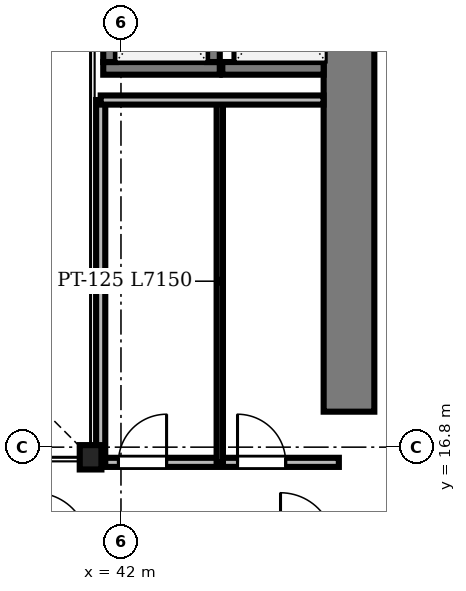
"""IFC4 building model, lengths in metres.
Left out: names, types, materials, properties, quantities, classifications, styles, units other than length and angle.
Written with IfcOpenShell. Run it as: python <this file> out.ifc"""

import sys

from ifc_helpers import new_model, si_unit, direction, frame, frame_2d, origin, origin_2d, place, context, subcontext, project, spatial, rectangle, i_section, extrude, source, transform, mapped, element, fill, save


model = new_model("IFC4")
c1 = context("Model", 3, precision=1e-05, world=origin(), true_north=direction((0.0, 1.0)))
c2 = subcontext(c1, "Body", "Model", "MODEL_VIEW")
j1 = project(units=[si_unit("LENGTHUNIT", "METRE"), si_unit("PLANEANGLEUNIT", "RADIAN")], contexts=[c1])
p1 = place(None, origin())
s1 = spatial("IfcSite", under=j1, at=p1, CompositionType="ELEMENT")
p2 = place(p1, origin())
s2 = spatial("IfcBuilding", under=s1, at=p2, CompositionType="ELEMENT")
p3 = place(p2, frame((0.0, 0.0, 56.8)))
s3 = spatial("IfcBuildingStorey", under=s2, at=p3, CompositionType="ELEMENT", Elevation=56.8)
m1 = source(origin(), c2, "Body", "SweptSolid", [
    extrude(rectangle(XDim=13.15, YDim=1.0, at=frame_2d((6.575, 0.0))), origin(), (0.0, 0.0, 1.0), 3.41),
])
p4 = place(p3, frame((46.5, 17.5, 0.0), z_axis=(0.0, 0.0, 1.0), x_axis=(0.0, 1.0, 0.0)))
e1 = element("IfcWall", 1, at=p4, inside=s3, PredefinedType="SHEAR", context=c2, shape_type="MappedRepresentation", body=[
    mapped(m1, transform((0.0, 0.0, 0.0), scale=1.0)),
])
m2 = source(origin(), c2, "Body", "SweptSolid", [
    extrude(i_section(OverallWidth=0.428, OverallDepth=0.481, WebThickness=0.04, FlangeThickness=0.063, FilletRadius=0.015, at=origin_2d()), origin(), (0.0, 0.0, 1.0), 3.41),
])
p5 = place(p3, frame((41.4, 16.6, 0.0), z_axis=(0.0, 0.0, 1.0), x_axis=(1.0, 0.0, 0.0)))
e2 = element("IfcColumn", 2, at=p5, inside=s3, PredefinedType="COLUMN", context=c2, shape_type="MappedRepresentation", body=[
    mapped(m2, transform((0.0, 0.0, 0.0), scale=1.0)),
])
m3 = source(origin(), c2, "Body", "SweptSolid", [
    extrude(rectangle(XDim=2.3, YDim=0.25, at=frame_2d((1.15, 0.0))), origin(), (0.0, 0.0, 1.0), 3.41),
])
for number, where, z_axis, x_axis in (
    (3, (41.65, 24.275, 0.0), (0.0, 0.0, 1.0), (1.0, 0.0, 0.0)),
    (4, (41.775, 24.4, 0.0), (0.0, 0.0, 1.0), (0.0, 1.0, 0.0)),
    (5, (43.825, 24.4, 0.0), (0.0, 0.0, 1.0), (0.0, 1.0, 0.0)),
):
    element("IfcWall", number, at=place(p3, frame(where, z_axis=z_axis, x_axis=x_axis)), inside=s3, PredefinedType="SOLIDWALL", context=c2, shape_type="MappedRepresentation", body=[
        mapped(m3, transform((0.0, 0.0, 0.0), scale=1.0)),
    ])
m4 = source(origin(), c2, "Body", "SweptSolid", [
    extrude(rectangle(XDim=2.0, YDim=0.25, at=frame_2d((1.0, 0.0))), origin(), (0.0, 0.0, 1.0), 3.41),
])
p6 = place(p3, frame((44.0, 24.275, 0.0), z_axis=(0.0, 0.0, 1.0), x_axis=(1.0, 0.0, 0.0)))
e6 = element("IfcWall", 6, at=p6, inside=s3, PredefinedType="SOLIDWALL", context=c2, shape_type="MappedRepresentation", body=[
    mapped(m4, transform((0.0, 0.0, 0.0), scale=1.0)),
])
m5 = source(origin(), c2, "Body", "SweptSolid", [
    extrude(rectangle(XDim=4.7, YDim=0.18, at=frame_2d((2.35, 0.0))), origin(), (0.0, 0.0, 1.0), 2.802),
])
p7 = place(p3, frame((41.6, 16.5, 0.0), z_axis=(0.0, 0.0, 1.0), x_axis=(1.0, 0.0, 0.0)))
e7 = element("IfcWall", 7, at=p7, inside=s3, PredefinedType="PARTITIONING", context=c2, shape_type="MappedRepresentation", body=[
    mapped(m5, transform((0.0, 0.0, 0.0), scale=1.0)),
])
m6 = source(origin(), c2, "Body", "SweptSolid", [
    extrude(rectangle(XDim=0.95, YDim=2.15, at=frame_2d((0.475, 1.075))), frame((0.0, 0.1, 0.0), z_axis=(0.0, -1.0, 0.0), x_axis=(1.0, 0.0, 0.0)), (0.0, 0.0, 1.0), 0.2),
])
p8 = place(p7, frame((0.35, 0.0, 0.0)))
e8 = element("IfcOpeningElement", 8, at=p8, cuts=e7, PredefinedType="OPENING", context=c2, shape_type="MappedRepresentation", body=[
    mapped(m6, transform((0.0, 0.0, 0.0), scale=1.0)),
])
p9 = place(p7, frame((2.7, 0.0, 0.0)))
e9 = element("IfcOpeningElement", 9, at=p9, cuts=e7, PredefinedType="OPENING", context=c2, shape_type="MappedRepresentation", body=[
    mapped(m6, transform((0.0, 0.0, 0.0), scale=1.0)),
])
m7 = source(origin(), c2, "Body", "SweptSolid", [
    extrude(rectangle(XDim=7.15, YDim=0.18, at=frame_2d((3.575, 0.0))), origin(), (0.0, 0.0, 1.0), 2.802),
])
p10 = place(p3, frame((41.6, 16.5, 0.0), z_axis=(0.0, 0.0, 1.0), x_axis=(0.0, 1.0, 0.0)))
e10 = element("IfcWall", 10, at=p10, inside=s3, PredefinedType="PARTITIONING", context=c2, shape_type="MappedRepresentation", body=[
    mapped(m7, transform((0.0, 0.0, 0.0), scale=1.0)),
])
m8 = source(origin(), c2, "Body", "SweptSolid", [
    extrude(rectangle(XDim=7.15, YDim=0.125, at=frame_2d((3.575, 0.0))), origin(), (0.0, 0.0, 1.0), 2.802),
])
p11 = place(p3, frame((43.95, 16.5, 0.0), z_axis=(0.0, 0.0, 1.0), x_axis=(0.0, 1.0, 0.0)))
e11 = element("IfcWall", 11, at=p11, inside=s3, PredefinedType="PARTITIONING", context=c2, shape_type="MappedRepresentation", body=[
    mapped(m8, transform((0.0, 0.0, 0.0), scale=1.0)),
])
m9 = source(origin(), c2, "Body", "SweptSolid", [
    extrude(rectangle(XDim=4.398, YDim=0.18, at=frame_2d((2.199, 0.0))), origin(), (0.0, 0.0, 1.0), 3.41),
])
p12 = place(p3, frame((41.6, 23.65, 0.0), z_axis=(0.0, 0.0, 1.0), x_axis=(1.0, 0.0, 0.0)))
e12 = element("IfcWall", 12, at=p12, inside=s3, PredefinedType="PARTITIONING", context=c2, shape_type="MappedRepresentation", body=[
    mapped(m9, transform((0.0, 0.0, 0.0), scale=1.0)),
])
m10 = source(origin(), c2, "Body", "SweptSolid", [
    extrude(rectangle(XDim=0.95, YDim=2.15, at=frame_2d((0.475, 1.075))), frame((0.0, 0.025, 0.0), z_axis=(0.0, -1.0, 0.0), x_axis=(1.0, 0.0, 0.0)), (0.0, 0.0, 1.0), 0.05),
])
p13 = place(p8, origin())
e13 = element("IfcDoor", 13, at=p13, inside=s3, OperationType="SINGLE_SWING_RIGHT", PredefinedType="DOOR", context=c2, shape_type="MappedRepresentation", body=[
    mapped(m10, transform((0.0, 0.0, 0.0), scale=1.0)),
])
fill(e8, e13)
p14 = place(p9, origin())
e14 = element("IfcDoor", 14, at=p14, inside=s3, OperationType="SINGLE_SWING_LEFT", PredefinedType="DOOR", context=c2, shape_type="MappedRepresentation", body=[
    mapped(m10, transform((0.0, 0.0, 0.0), scale=1.0)),
])
fill(e9, e14)
save(model, sys.argv[1])
